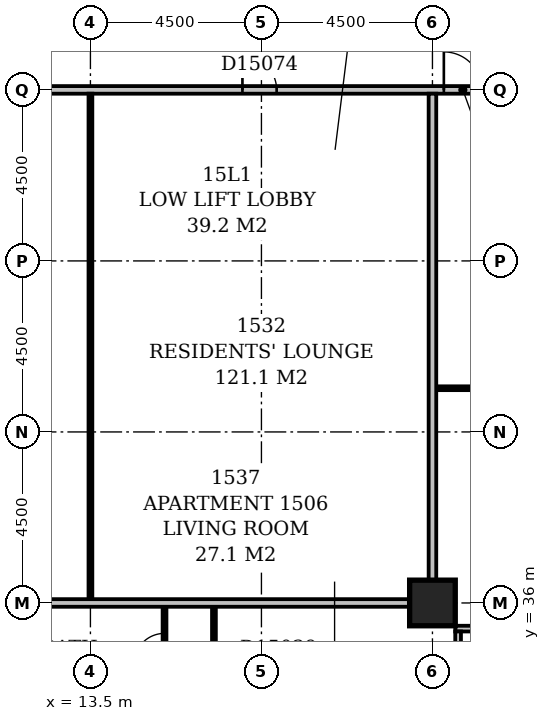
"""IFC4 building model, lengths in metres.
Left out: names, types, materials, properties, quantities, classifications, styles, units other than length and angle.
Written with IfcOpenShell. Run it as: python <this file> out.ifc"""

import sys

from ifc_helpers import new_model, si_unit, direction, frame, frame_2d, origin, origin_2d, place, context, subcontext, project, spatial, rectangle, extrude, element, fill, save


model = new_model("IFC4")
c1 = context("Model", 3, precision=1e-05, world=origin(), true_north=direction((0.0, 1.0)))
c2 = subcontext(c1, "Body", "Model", "MODEL_VIEW")
j1 = project(units=[si_unit("LENGTHUNIT", "METRE"), si_unit("PLANEANGLEUNIT", "RADIAN")], contexts=[c1])
p1 = place(None, origin())
s1 = spatial("IfcSite", under=j1, at=p1, CompositionType="ELEMENT")
p2 = place(p1, origin())
s2 = spatial("IfcBuilding", under=s1, at=p2, CompositionType="ELEMENT")
p3 = place(p2, frame((0.0, 0.0, 65.0)))
s3 = spatial("IfcBuildingStorey", under=s2, at=p3, CompositionType="ELEMENT", Elevation=65.0)
p4 = place(p3, frame((22.5, 36.0, -0.3), z_axis=(0.0, 0.0, 1.0), x_axis=(1.0, 0.0, 0.0)))
e1 = element("IfcColumn", 1, at=p4, inside=s3, PredefinedType="COLUMN", context=c2, shape_type="SweptSolid", body=[
    extrude(rectangle(XDim=1.2, YDim=1.2, at=origin_2d()), origin(), (0.0, 0.0, 1.0), 3.6),
])
p5 = place(p3, frame((23.175, 17.4, 0.0), z_axis=(0.0, 0.0, 1.0), x_axis=(0.0, 1.0, 0.0)))
e2 = element("IfcWall", 2, at=p5, inside=s3, PredefinedType="STANDARD", context=c2, shape_type="SweptSolid", body=[
    extrude(rectangle(XDim=17.85, YDim=0.15, at=frame_2d((8.925, 0.0))), origin(), (0.0, 0.0, 1.0), 2.7),
])
p6 = place(p5, frame((1.65, 0.0, 0.6)))
e3 = element("IfcOpeningElement", 3, at=p6, cuts=e2, PredefinedType="OPENING", context=c2, shape_type="SweptSolid", body=[
    extrude(rectangle(XDim=2.4, YDim=1.8, at=frame_2d((1.2, 0.9))), frame((0.0, 0.087, 0.0), z_axis=(0.0, -1.0, 0.0), x_axis=(1.0, 0.0, 0.0)), (0.0, 0.0, 1.0), 0.174),
])
p7 = place(p5, frame((6.15, 0.0, 0.6)))
e4 = element("IfcOpeningElement", 4, at=p7, cuts=e2, PredefinedType="OPENING", context=c2, shape_type="SweptSolid", body=[
    extrude(rectangle(XDim=2.4, YDim=1.8, at=frame_2d((1.2, 0.9))), frame((0.0, 0.087, 0.0), z_axis=(0.0, -1.0, 0.0), x_axis=(1.0, 0.0, 0.0)), (0.0, 0.0, 1.0), 0.174),
])
p8 = place(p5, frame((10.479, 0.0, 0.6)))
e5 = element("IfcOpeningElement", 5, at=p8, cuts=e2, PredefinedType="OPENING", context=c2, shape_type="SweptSolid", body=[
    extrude(rectangle(XDim=1.8, YDim=1.8, at=frame_2d((0.9, 0.9))), frame((0.0, 0.087, 0.0), z_axis=(0.0, -1.0, 0.0), x_axis=(1.0, 0.0, 0.0)), (0.0, 0.0, 1.0), 0.174),
])
p9 = place(p5, frame((15.15, 0.0, 0.6)))
e6 = element("IfcOpeningElement", 6, at=p9, cuts=e2, PredefinedType="OPENING", context=c2, shape_type="SweptSolid", body=[
    extrude(rectangle(XDim=2.4, YDim=1.8, at=frame_2d((1.2, 0.9))), frame((0.0, 0.087, 0.0), z_axis=(0.0, -1.0, 0.0), x_axis=(1.0, 0.0, 0.0)), (0.0, 0.0, 1.0), 0.174),
])
p10 = place(p3, frame((23.1, 35.325, 0.0), z_axis=(0.0, 0.0, 1.0), x_axis=(1.0, 0.0, 0.0)))
e7 = element("IfcWall", 7, at=p10, inside=s3, PredefinedType="STANDARD", context=c2, shape_type="SweptSolid", body=[
    extrude(rectangle(XDim=45.15, YDim=0.15, at=frame_2d((22.575, 0.0))), origin(), (0.0, 0.0, 1.0), 2.7),
])
p11 = place(p10, frame((0.45, 0.0, 0.6)))
e8 = element("IfcOpeningElement", 8, at=p11, cuts=e7, PredefinedType="OPENING", context=c2, shape_type="SweptSolid", body=[
    extrude(rectangle(XDim=2.4, YDim=1.8, at=frame_2d((1.2, 0.9))), frame((0.0, 0.087, 0.0), z_axis=(0.0, -1.0, 0.0), x_axis=(1.0, 0.0, 0.0)), (0.0, 0.0, 1.0), 0.174),
])
p12 = place(p10, frame((4.95, 0.0, 0.6)))
e9 = element("IfcOpeningElement", 9, at=p12, cuts=e7, PredefinedType="OPENING", context=c2, shape_type="SweptSolid", body=[
    extrude(rectangle(XDim=2.4, YDim=1.8, at=frame_2d((1.2, 0.9))), frame((0.0, 0.087, 0.0), z_axis=(0.0, -1.0, 0.0), x_axis=(1.0, 0.0, 0.0)), (0.0, 0.0, 1.0), 0.174),
])
p13 = place(p10, frame((10.877, 0.0, 0.6)))
e10 = element("IfcOpeningElement", 10, at=p13, cuts=e7, PredefinedType="OPENING", context=c2, shape_type="SweptSolid", body=[
    extrude(rectangle(XDim=1.2, YDim=1.8, at=frame_2d((0.6, 0.9))), frame((0.0, 0.087, 0.0), z_axis=(0.0, -1.0, 0.0), x_axis=(1.0, 0.0, 0.0)), (0.0, 0.0, 1.0), 0.174),
])
p14 = place(p10, frame((13.823, 0.0, 0.6)))
e11 = element("IfcOpeningElement", 11, at=p14, cuts=e7, PredefinedType="OPENING", context=c2, shape_type="SweptSolid", body=[
    extrude(rectangle(XDim=1.2, YDim=1.8, at=frame_2d((0.6, 0.9))), frame((0.0, 0.087, 0.0), z_axis=(0.0, -1.0, 0.0), x_axis=(1.0, 0.0, 0.0)), (0.0, 0.0, 1.0), 0.174),
])
p15 = place(p10, frame((18.45, 0.0, 0.6)))
e12 = element("IfcOpeningElement", 12, at=p15, cuts=e7, PredefinedType="OPENING", context=c2, shape_type="SweptSolid", body=[
    extrude(rectangle(XDim=2.4, YDim=1.8, at=frame_2d((1.2, 0.9))), frame((0.0, 0.087, 0.0), z_axis=(0.0, -1.0, 0.0), x_axis=(1.0, 0.0, 0.0)), (0.0, 0.0, 1.0), 0.174),
])
p16 = place(p10, frame((22.95, 0.0, 0.6)))
e13 = element("IfcOpeningElement", 13, at=p16, cuts=e7, PredefinedType="OPENING", context=c2, shape_type="SweptSolid", body=[
    extrude(rectangle(XDim=2.4, YDim=1.8, at=frame_2d((1.2, 0.9))), frame((0.0, 0.087, 0.0), z_axis=(0.0, -1.0, 0.0), x_axis=(1.0, 0.0, 0.0)), (0.0, 0.0, 1.0), 0.174),
])
p17 = place(p10, frame((27.45, 0.0, 0.6)))
e14 = element("IfcOpeningElement", 14, at=p17, cuts=e7, PredefinedType="OPENING", context=c2, shape_type="SweptSolid", body=[
    extrude(rectangle(XDim=2.4, YDim=1.8, at=frame_2d((1.2, 0.9))), frame((0.0, 0.087, 0.0), z_axis=(0.0, -1.0, 0.0), x_axis=(1.0, 0.0, 0.0)), (0.0, 0.0, 1.0), 0.174),
])
p18 = place(p10, frame((31.95, 0.0, 0.6)))
e15 = element("IfcOpeningElement", 15, at=p18, cuts=e7, PredefinedType="OPENING", context=c2, shape_type="SweptSolid", body=[
    extrude(rectangle(XDim=2.4, YDim=1.8, at=frame_2d((1.2, 0.9))), frame((0.0, 0.087, 0.0), z_axis=(0.0, -1.0, 0.0), x_axis=(1.0, 0.0, 0.0)), (0.0, 0.0, 1.0), 0.174),
])
p19 = place(p10, frame((36.45, 0.0, 0.6)))
e16 = element("IfcOpeningElement", 16, at=p19, cuts=e7, PredefinedType="OPENING", context=c2, shape_type="SweptSolid", body=[
    extrude(rectangle(XDim=2.4, YDim=1.8, at=frame_2d((1.2, 0.9))), frame((0.0, 0.087, 0.0), z_axis=(0.0, -1.0, 0.0), x_axis=(1.0, 0.0, 0.0)), (0.0, 0.0, 1.0), 0.174),
])
p20 = place(p10, frame((41.403, 0.0, 0.6)))
e17 = element("IfcOpeningElement", 17, at=p20, cuts=e7, PredefinedType="OPENING", context=c2, shape_type="SweptSolid", body=[
    extrude(rectangle(XDim=2.1, YDim=1.8, at=frame_2d((1.05, 0.9))), frame((0.0, 0.087, 0.0), z_axis=(0.0, -1.0, 0.0), x_axis=(1.0, 0.0, 0.0)), (0.0, 0.0, 1.0), 0.174),
])
p21 = place(p3, frame((16.75, 27.1, 0.0), z_axis=(0.0, 0.0, 1.0), x_axis=(0.0, 1.0, 0.0)))
e18 = element("IfcWall", 18, at=p21, inside=s3, PredefinedType="PARTITIONING", context=c2, shape_type="SweptSolid", body=[
    extrude(rectangle(XDim=8.8, YDim=0.1, at=frame_2d((4.4, 0.0))), origin(), (0.0, 0.0, 1.0), 3.3),
])
p22 = place(p21, frame((1.7, 0.0, 0.0)))
e19 = element("IfcOpeningElement", 19, at=p22, cuts=e18, PredefinedType="OPENING", context=c2, shape_type="SweptSolid", body=[
    extrude(rectangle(XDim=0.9, YDim=2.1, at=frame_2d((0.45, 1.05))), frame((0.0, 0.062, 0.0), z_axis=(0.0, -1.0, 0.0), x_axis=(1.0, 0.0, 0.0)), (0.0, 0.0, 1.0), 0.124),
])
p23 = place(p21, frame((6.2, 0.0, 0.0)))
e20 = element("IfcOpeningElement", 20, at=p23, cuts=e18, PredefinedType="OPENING", context=c2, shape_type="SweptSolid", body=[
    extrude(rectangle(XDim=0.9, YDim=2.1, at=frame_2d((0.45, 1.05))), frame((0.0, 0.062, 0.0), z_axis=(0.0, -1.0, 0.0), x_axis=(1.0, 0.0, 0.0)), (0.0, 0.0, 1.0), 0.124),
])
p24 = place(p3, frame((15.45, 28.6, 0.0), z_axis=(0.0, 0.0, 1.0), x_axis=(0.0, 1.0, 0.0)))
e21 = element("IfcWall", 21, at=p24, inside=s3, PredefinedType="PARTITIONING", context=c2, shape_type="SweptSolid", body=[
    extrude(rectangle(XDim=7.3, YDim=0.1, at=frame_2d((3.65, 0.0))), origin(), (0.0, 0.0, 1.0), 3.3),
])
p25 = place(p24, frame((5.8, 0.0, 0.0)))
e22 = element("IfcOpeningElement", 22, at=p25, cuts=e21, PredefinedType="OPENING", context=c2, shape_type="SweptSolid", body=[
    extrude(rectangle(XDim=0.8, YDim=2.1, at=frame_2d((0.4, 1.05))), frame((0.0, 0.062, 0.0), z_axis=(0.0, -1.0, 0.0), x_axis=(1.0, 0.0, 0.0)), (0.0, 0.0, 1.0), 0.124),
])
p26 = place(p24, frame((2.05, 0.0, 0.0)))
e23 = element("IfcOpeningElement", 23, at=p26, cuts=e21, PredefinedType="OPENING", context=c2, shape_type="SweptSolid", body=[
    extrude(rectangle(XDim=0.9, YDim=2.1, at=frame_2d((0.45, 1.05))), frame((0.0, 0.062, 0.0), z_axis=(0.0, -1.0, 0.0), x_axis=(1.0, 0.0, 0.0)), (0.0, 0.0, 1.0), 0.124),
])
p27 = place(p3, frame((9.1, 36.0, 0.0), z_axis=(0.0, 0.0, 1.0), x_axis=(1.0, 0.0, 0.0)))
e24 = element("IfcWall", 24, at=p27, inside=s3, PredefinedType="PARTITIONING", context=c2, shape_type="SweptSolid", body=[
    extrude(rectangle(XDim=12.8, YDim=0.2, at=frame_2d((6.4, 0.0))), origin(), (0.0, 0.0, 1.0), 2.4),
])
p28 = place(p3, frame((13.5, 36.1, 0.0), z_axis=(0.0, 0.0, 1.0), x_axis=(0.0, 1.0, 0.0)))
e25 = element("IfcWall", 25, at=p28, inside=s3, PredefinedType="PARTITIONING", context=c2, shape_type="SweptSolid", body=[
    extrude(rectangle(XDim=13.3, YDim=0.1, at=frame_2d((6.65, 0.0))), origin(), (0.0, 0.0, 1.0), 3.3),
])
p29 = place(p3, frame((22.5, 36.6, 0.0), z_axis=(0.0, 0.0, 1.0), x_axis=(0.0, 1.0, 0.0)))
e26 = element("IfcWall", 26, at=p29, inside=s3, PredefinedType="PARTITIONING", context=c2, shape_type="SweptSolid", body=[
    extrude(rectangle(XDim=12.8, YDim=0.2, at=frame_2d((6.4, 0.0))), origin(), (0.0, 0.0, 1.0), 3.3),
])
p30 = place(p3, frame((22.6, 41.65, 0.0), z_axis=(0.0, 0.0, 1.0), x_axis=(1.0, 0.0, 0.0)))
e27 = element("IfcWall", 27, at=p30, inside=s3, PredefinedType="PARTITIONING", context=c2, shape_type="SweptSolid", body=[
    extrude(rectangle(XDim=13.3, YDim=0.1, at=frame_2d((6.65, 0.0))), origin(), (0.0, 0.0, 1.0), 3.3),
])
p31 = place(p30, frame((1.7, 0.0, 0.0)))
e28 = element("IfcOpeningElement", 28, at=p31, cuts=e27, PredefinedType="OPENING", context=c2, shape_type="SweptSolid", body=[
    extrude(rectangle(XDim=0.9, YDim=2.1, at=frame_2d((0.45, 1.05))), frame((0.0, 0.062, 0.0), z_axis=(0.0, -1.0, 0.0), x_axis=(1.0, 0.0, 0.0)), (0.0, 0.0, 1.0), 0.124),
])
p32 = place(p30, frame((6.2, 0.0, 0.0)))
e29 = element("IfcOpeningElement", 29, at=p32, cuts=e27, PredefinedType="OPENING", context=c2, shape_type="SweptSolid", body=[
    extrude(rectangle(XDim=0.9, YDim=2.1, at=frame_2d((0.45, 1.05))), frame((0.0, 0.062, 0.0), z_axis=(0.0, -1.0, 0.0), x_axis=(1.0, 0.0, 0.0)), (0.0, 0.0, 1.0), 0.124),
])
p33 = place(p30, frame((10.7, 0.0, 0.0)))
e30 = element("IfcOpeningElement", 30, at=p33, cuts=e27, PredefinedType="OPENING", context=c2, shape_type="SweptSolid", body=[
    extrude(rectangle(XDim=0.9, YDim=2.1, at=frame_2d((0.45, 1.05))), frame((0.0, 0.062, 0.0), z_axis=(0.0, -1.0, 0.0), x_axis=(1.0, 0.0, 0.0)), (0.0, 0.0, 1.0), 0.124),
])
p34 = place(p3, frame((9.1, 49.5, 0.0), z_axis=(0.0, 0.0, 1.0), x_axis=(1.0, 0.0, 0.0)))
e31 = element("IfcWall", 31, at=p34, inside=s3, PredefinedType="PARTITIONING", context=c2, shape_type="SweptSolid", body=[
    extrude(rectangle(XDim=57.8, YDim=0.2, at=frame_2d((28.9, 0.0))), origin(), (0.0, 0.0, 1.0), 3.3),
])
p35 = place(p34, frame((13.7, 0.0, 0.0)))
e32 = element("IfcOpeningElement", 32, at=p35, cuts=e31, PredefinedType="OPENING", context=c2, shape_type="SweptSolid", body=[
    extrude(rectangle(XDim=1.0, YDim=2.1, at=frame_2d((0.5, 1.05))), frame((0.0, 0.112, 0.0), z_axis=(0.0, -1.0, 0.0), x_axis=(1.0, 0.0, 0.0)), (0.0, 0.0, 1.0), 0.224),
])
p36 = place(p34, frame((32.2, 0.0, 0.0)))
e33 = element("IfcOpeningElement", 33, at=p36, cuts=e31, PredefinedType="OPENING", context=c2, shape_type="SweptSolid", body=[
    extrude(rectangle(XDim=1.0, YDim=2.1, at=frame_2d((0.5, 1.05))), frame((0.0, 0.112, 0.0), z_axis=(0.0, -1.0, 0.0), x_axis=(1.0, 0.0, 0.0)), (0.0, 0.0, 1.0), 0.224),
])
p37 = place(p34, frame((37.85, 0.0, 0.0)))
e34 = element("IfcOpeningElement", 34, at=p37, cuts=e31, PredefinedType="OPENING", context=c2, shape_type="SweptSolid", body=[
    extrude(rectangle(XDim=1.0, YDim=2.1, at=frame_2d((0.5, 1.05))), frame((0.0, 0.112, 0.0), z_axis=(0.0, -1.0, 0.0), x_axis=(1.0, 0.0, 0.0)), (0.0, 0.0, 1.0), 0.224),
])
p38 = place(p34, frame((45.7, 0.0, 0.0)))
e35 = element("IfcOpeningElement", 35, at=p38, cuts=e31, PredefinedType="OPENING", context=c2, shape_type="SweptSolid", body=[
    extrude(rectangle(XDim=1.0, YDim=2.1, at=frame_2d((0.5, 1.05))), frame((0.0, 0.112, 0.0), z_axis=(0.0, -1.0, 0.0), x_axis=(1.0, 0.0, 0.0)), (0.0, 0.0, 1.0), 0.224),
])
p39 = place(p34, frame((49.7, 0.0, 0.0)))
e36 = element("IfcOpeningElement", 36, at=p39, cuts=e31, PredefinedType="OPENING", context=c2, shape_type="SweptSolid", body=[
    extrude(rectangle(XDim=1.0, YDim=2.1, at=frame_2d((0.5, 1.05))), frame((0.0, 0.112, 0.0), z_axis=(0.0, -1.0, 0.0), x_axis=(1.0, 0.0, 0.0)), (0.0, 0.0, 1.0), 0.224),
])
p40 = place(p34, frame((8.4, 0.0, 0.0)))
e37 = element("IfcOpeningElement", 37, at=p40, cuts=e31, PredefinedType="OPENING", context=c2, shape_type="SweptSolid", body=[
    extrude(rectangle(XDim=0.9, YDim=2.1, at=frame_2d((0.45, 1.05))), frame((0.0, 0.112, 0.0), z_axis=(0.0, -1.0, 0.0), x_axis=(1.0, 0.0, 0.0)), (0.0, 0.0, 1.0), 0.224),
])
p41 = place(p25, origin())
e38 = element("IfcDoor", 38, at=p41, inside=s3, OperationType="SINGLE_SWING_LEFT", PredefinedType="DOOR", context=c2, shape_type="SweptSolid", body=[
    extrude(rectangle(XDim=0.8, YDim=2.1, at=frame_2d((0.4, 1.05))), frame((0.0, 0.025, 0.0), z_axis=(0.0, -1.0, 0.0), x_axis=(1.0, 0.0, 0.0)), (0.0, 0.0, 1.0), 0.05),
])
fill(e22, e38)
p42 = place(p35, origin())
e39 = element("IfcDoor", 39, at=p42, inside=s3, OperationType="SINGLE_SWING_LEFT", PredefinedType="DOOR", context=c2, shape_type="SweptSolid", body=[
    extrude(rectangle(XDim=1.0, YDim=2.1, at=frame_2d((0.5, 1.05))), frame((0.0, 0.025, 0.0), z_axis=(0.0, -1.0, 0.0), x_axis=(1.0, 0.0, 0.0)), (0.0, 0.0, 1.0), 0.05),
])
fill(e32, e39)
p43 = place(p40, origin())
e40 = element("IfcDoor", 40, at=p43, inside=s3, OperationType="SINGLE_SWING_LEFT", PredefinedType="DOOR", context=c2, shape_type="SweptSolid", body=[
    extrude(rectangle(XDim=0.9, YDim=2.1, at=frame_2d((0.45, 1.05))), frame((0.0, 0.025, 0.0), z_axis=(0.0, -1.0, 0.0), x_axis=(1.0, 0.0, 0.0)), (0.0, 0.0, 1.0), 0.05),
])
fill(e37, e40)
save(model, sys.argv[1])
